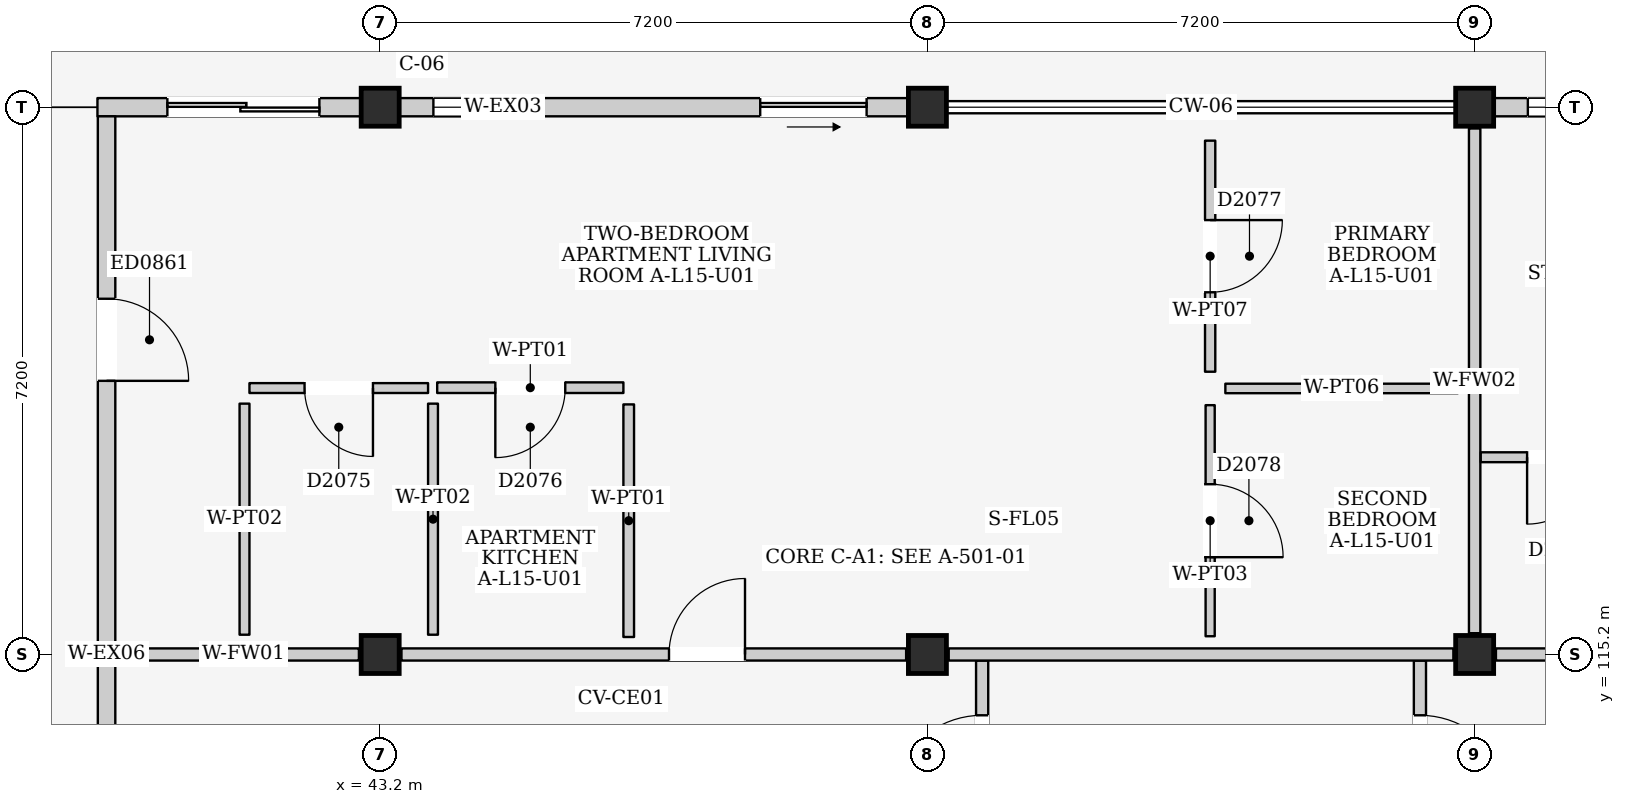
"""IFC4 building model, lengths in metres.
Left out: names, types, materials, properties, quantities, classifications, styles, units other than length and angle.
Written with IfcOpenShell. Run it as: python <this file> out.ifc"""

import sys

from ifc_helpers import new_model, si_unit, direction, frame, frame_2d, origin, origin_2d, place, context, subcontext, project, spatial, rectangle, extrude, element, fill, save


model = new_model("IFC4")
c1 = context("Model", 3, precision=1e-05, world=origin(), true_north=direction((0.0, 1.0)))
c2 = subcontext(c1, "Body", "Model", "MODEL_VIEW")
j1 = project(units=[si_unit("LENGTHUNIT", "METRE"), si_unit("PLANEANGLEUNIT", "RADIAN")], contexts=[c1])
p1 = place(None, origin())
s1 = spatial("IfcSite", under=j1, at=p1, CompositionType="ELEMENT")
p2 = place(p1, origin())
s2 = spatial("IfcBuilding", under=s1, at=p2, CompositionType="ELEMENT")
p3 = place(p2, frame((0.0, 0.0, 50.9)))
s3 = spatial("IfcBuildingStorey", under=s2, at=p3, CompositionType="ELEMENT", Elevation=50.9)
for number, where, z_axis, x_axis in (
    (1, (43.2, 115.2, 0.0), (0.0, 0.0, 1.0), (1.0, 0.0, 0.0)),
    (2, (43.2, 122.4, 0.0), (0.0, 0.0, 1.0), (1.0, 0.0, 0.0)),
    (3, (50.4, 115.2, 0.0), (0.0, 0.0, 1.0), (1.0, 0.0, 0.0)),
    (4, (50.4, 122.4, 0.0), (0.0, 0.0, 1.0), (1.0, 0.0, 0.0)),
    (5, (57.6, 115.2, 0.0), (0.0, 0.0, 1.0), (1.0, 0.0, 0.0)),
    (6, (57.6, 122.4, 0.0), (0.0, 0.0, 1.0), (1.0, 0.0, 0.0)),
):
    element("IfcColumn", number, at=place(p3, frame(where, z_axis=z_axis, x_axis=x_axis)), inside=s3, PredefinedType="COLUMN", context=c2, shape_type="SweptSolid", body=[
        extrude(rectangle(XDim=0.5, YDim=0.5, at=origin_2d()), origin(), (0.0, 0.0, 1.0), 3.2),
    ])
p4 = place(p3, frame((39.48, 122.4, 0.0), z_axis=(0.0, 0.0, 1.0), x_axis=(1.0, 0.0, 0.0)))
e7 = element("IfcWall", 7, at=p4, inside=s3, PredefinedType="ELEMENTEDWALL", context=c2, shape_type="SweptSolid", body=[
    extrude(rectangle(XDim=3.47, YDim=0.24, at=frame_2d((1.735, 0.0))), origin(), (0.0, 0.0, 1.0), 2.295),
])
p5 = place(p4, frame((0.92, 0.0, 0.0)))
e8 = element("IfcOpeningElement", 8, at=p5, cuts=e7, PredefinedType="OPENING", context=c2, shape_type="SweptSolid", body=[
    extrude(rectangle(XDim=2.0, YDim=2.12, at=frame_2d((1.0, 1.06))), frame((0.0, 0.135, 0.0), z_axis=(0.0, -1.0, 0.0), x_axis=(1.0, 0.0, 0.0)), (0.0, 0.0, 1.0), 0.27),
])
p6 = place(p3, frame((43.45, 122.4, 0.0), z_axis=(0.0, 0.0, 1.0), x_axis=(1.0, 0.0, 0.0)))
e9 = element("IfcWall", 9, at=p6, inside=s3, PredefinedType="ELEMENTEDWALL", context=c2, shape_type="SweptSolid", body=[
    extrude(rectangle(XDim=6.7, YDim=0.24, at=frame_2d((3.35, 0.0))), origin(), (0.0, 0.0, 1.0), 2.495),
])
p7 = place(p6, frame((4.75, 0.0, 0.0)))
e10 = element("IfcOpeningElement", 10, at=p7, cuts=e9, PredefinedType="OPENING", context=c2, shape_type="SweptSolid", body=[
    extrude(rectangle(XDim=1.4, YDim=2.1, at=frame_2d((0.7, 1.05))), frame((0.0, 0.135, 0.0), z_axis=(0.0, -1.0, 0.0), x_axis=(1.0, 0.0, 0.0)), (0.0, 0.0, 1.0), 0.27),
])
p8 = place(p6, frame((0.45, 0.0, 0.9)))
e11 = element("IfcOpeningElement", 11, at=p8, cuts=e9, PredefinedType="OPENING", context=c2, shape_type="SweptSolid", body=[
    extrude(rectangle(XDim=1.3, YDim=1.25, at=frame_2d((0.65, 0.625))), frame((0.0, 0.135, 0.0), z_axis=(0.0, -1.0, 0.0), x_axis=(1.0, 0.0, 0.0)), (0.0, 0.0, 1.0), 0.27),
])
p9 = place(p3, frame((57.85, 122.4, 0.0), z_axis=(0.0, 0.0, 1.0), x_axis=(1.0, 0.0, 0.0)))
e12 = element("IfcWall", 12, at=p9, inside=s3, PredefinedType="ELEMENTEDWALL", context=c2, shape_type="SweptSolid", body=[
    extrude(rectangle(XDim=6.7, YDim=0.24, at=frame_2d((3.35, 0.0))), origin(), (0.0, 0.0, 1.0), 2.495),
])
p10 = place(p9, frame((4.55, 0.0, 0.0)))
e13 = element("IfcOpeningElement", 13, at=p10, cuts=e12, PredefinedType="OPENING", context=c2, shape_type="SweptSolid", body=[
    extrude(rectangle(XDim=1.6, YDim=2.12, at=frame_2d((0.8, 1.06))), frame((0.0, 0.135, 0.0), z_axis=(0.0, -1.0, 0.0), x_axis=(1.0, 0.0, 0.0)), (0.0, 0.0, 1.0), 0.27),
])
p11 = place(p9, frame((0.45, 0.0, 0.835)))
e14 = element("IfcOpeningElement", 14, at=p11, cuts=e12, PredefinedType="OPENING", context=c2, shape_type="SweptSolid", body=[
    extrude(rectangle(XDim=1.75, YDim=1.55, at=frame_2d((0.875, 0.775))), frame((0.0, 0.135, 0.0), z_axis=(0.0, -1.0, 0.0), x_axis=(1.0, 0.0, 0.0)), (0.0, 0.0, 1.0), 0.27),
])
p12 = place(p3, frame((39.6, 108.12, 0.0), z_axis=(0.0, 0.0, 1.0), x_axis=(0.0, 1.0, 0.0)))
e15 = element("IfcWall", 15, at=p12, inside=s3, PredefinedType="ELEMENTEDWALL", context=c2, shape_type="SweptSolid", body=[
    extrude(rectangle(XDim=7.08, YDim=0.23, at=frame_2d((3.54, 0.0))), origin(), (0.0, 0.0, 1.0), 2.395),
])
p13 = place(p12, frame((2.75, 0.0, 1.1)))
e16 = element("IfcOpeningElement", 16, at=p13, cuts=e15, PredefinedType="OPENING", context=c2, shape_type="SweptSolid", body=[
    extrude(rectangle(XDim=1.0, YDim=0.9, at=frame_2d((0.5, 0.45))), frame((0.0, 0.13, 0.0), z_axis=(0.0, -1.0, 0.0), x_axis=(1.0, 0.0, 0.0)), (0.0, 0.0, 1.0), 0.26),
])
p14 = place(p3, frame((39.6, 115.2, 0.0), z_axis=(0.0, 0.0, 1.0), x_axis=(0.0, 1.0, 0.0)))
e17 = element("IfcWall", 17, at=p14, inside=s3, PredefinedType="ELEMENTEDWALL", context=c2, shape_type="SweptSolid", body=[
    extrude(rectangle(XDim=7.08, YDim=0.23, at=frame_2d((3.54, 0.0))), origin(), (0.0, 0.0, 1.0), 2.395),
])
p15 = place(p14, frame((3.6, 0.0, 0.0)))
e18 = element("IfcOpeningElement", 18, at=p15, cuts=e17, PredefinedType="OPENING", context=c2, shape_type="SweptSolid", body=[
    extrude(rectangle(XDim=1.08, YDim=2.12, at=frame_2d((0.54, 1.06))), frame((0.0, 0.13, 0.0), z_axis=(0.0, -1.0, 0.0), x_axis=(1.0, 0.0, 0.0)), (0.0, 0.0, 1.0), 0.26),
])
p16 = place(p3, frame((51.12, 111.1, 0.0), z_axis=(0.0, 0.0, 1.0), x_axis=(0.0, 1.0, 0.0)))
e19 = element("IfcWall", 19, at=p16, inside=s3, PredefinedType="PARTITIONING", context=c2, shape_type="SweptSolid", body=[
    extrude(rectangle(XDim=4.02, YDim=0.16, at=frame_2d((2.01, 0.0))), origin(), (0.0, 0.0, 1.0), 2.96),
])
p17 = place(p16, frame((2.1, 0.0, 0.0)))
e20 = element("IfcOpeningElement", 20, at=p17, cuts=e19, PredefinedType="OPENING", context=c2, shape_type="SweptSolid", body=[
    extrude(rectangle(XDim=1.2, YDim=2.2, at=frame_2d((0.6, 1.1))), frame((0.0, 0.095, 0.0), z_axis=(0.0, -1.0, 0.0), x_axis=(1.0, 0.0, 0.0)), (0.0, 0.0, 1.0), 0.19),
])
p18 = place(p3, frame((56.88, 111.1, 0.0), z_axis=(0.0, 0.0, 1.0), x_axis=(0.0, 1.0, 0.0)))
e21 = element("IfcWall", 21, at=p18, inside=s3, PredefinedType="PARTITIONING", context=c2, shape_type="SweptSolid", body=[
    extrude(rectangle(XDim=4.02, YDim=0.16, at=frame_2d((2.01, 0.0))), origin(), (0.0, 0.0, 1.0), 2.96),
])
p19 = place(p18, frame((2.1, 0.0, 0.0)))
e22 = element("IfcOpeningElement", 22, at=p19, cuts=e21, PredefinedType="OPENING", context=c2, shape_type="SweptSolid", body=[
    extrude(rectangle(XDim=1.2, YDim=2.2, at=frame_2d((0.6, 1.1))), frame((0.0, 0.095, 0.0), z_axis=(0.0, -1.0, 0.0), x_axis=(1.0, 0.0, 0.0)), (0.0, 0.0, 1.0), 0.19),
])
p20 = place(p3, frame((39.88, 115.2, 0.0), z_axis=(0.0, 0.0, 1.0), x_axis=(1.0, 0.0, 0.0)))
e23 = element("IfcWall", 23, at=p20, inside=s3, PredefinedType="PARTITIONING", context=c2, shape_type="SweptSolid", body=[
    extrude(rectangle(XDim=3.04, YDim=0.16, at=frame_2d((1.52, 0.0))), origin(), (0.0, 0.0, 1.0), 2.295),
])
p21 = place(p3, frame((43.48, 115.2, 0.0), z_axis=(0.0, 0.0, 1.0), x_axis=(1.0, 0.0, 0.0)))
e24 = element("IfcWall", 24, at=p21, inside=s3, PredefinedType="PARTITIONING", context=c2, shape_type="SweptSolid", body=[
    extrude(rectangle(XDim=6.64, YDim=0.16, at=frame_2d((3.32, 0.0))), origin(), (0.0, 0.0, 1.0), 2.295),
])
p22 = place(p21, frame((3.52, 0.0, 0.0)))
e25 = element("IfcOpeningElement", 25, at=p22, cuts=e24, PredefinedType="OPENING", context=c2, shape_type="SweptSolid", body=[
    extrude(rectangle(XDim=1.0, YDim=2.15, at=frame_2d((0.5, 1.075))), frame((0.0, 0.095, 0.0), z_axis=(0.0, -1.0, 0.0), x_axis=(1.0, 0.0, 0.0)), (0.0, 0.0, 1.0), 0.19),
])
p23 = place(p3, frame((50.68, 115.2, 0.0), z_axis=(0.0, 0.0, 1.0), x_axis=(1.0, 0.0, 0.0)))
e26 = element("IfcWall", 26, at=p23, inside=s3, PredefinedType="PARTITIONING", context=c2, shape_type="SweptSolid", body=[
    extrude(rectangle(XDim=6.64, YDim=0.16, at=frame_2d((3.32, 0.0))), origin(), (0.0, 0.0, 1.0), 2.295),
])
p24 = place(p3, frame((57.6, 115.48, 0.0), z_axis=(0.0, 0.0, 1.0), x_axis=(0.0, 1.0, 0.0)))
e27 = element("IfcWall", 27, at=p24, inside=s3, PredefinedType="PARTITIONING", context=c2, shape_type="SweptSolid", body=[
    extrude(rectangle(XDim=6.64, YDim=0.15, at=frame_2d((3.32, 0.0))), origin(), (0.0, 0.0, 1.0), 2.445),
])
p25 = place(p3, frame((41.48, 118.705, 0.0), z_axis=(0.0, 0.0, 1.0), x_axis=(1.0, 0.0, 0.0)))
e28 = element("IfcWall", 28, at=p25, inside=s3, PredefinedType="PARTITIONING", context=c2, shape_type="SweptSolid", body=[
    extrude(rectangle(XDim=2.35, YDim=0.13, at=frame_2d((1.175, 0.0))), origin(), (0.0, 0.0, 1.0), 2.96),
])
p26 = place(p25, frame((0.725, 0.0, 0.0)))
e29 = element("IfcOpeningElement", 29, at=p26, cuts=e28, PredefinedType="OPENING", context=c2, shape_type="SweptSolid", body=[
    extrude(rectangle(XDim=0.9, YDim=2.1, at=frame_2d((0.45, 1.05))), frame((0.0, 0.08, 0.0), z_axis=(0.0, -1.0, 0.0), x_axis=(1.0, 0.0, 0.0)), (0.0, 0.0, 1.0), 0.16),
])
for number, where, z_axis, x_axis in (
    (30, (43.895, 115.46, 0.0), (0.0, 0.0, 1.0), (0.0, 1.0, 0.0)),
    (31, (41.415, 115.46, 0.0), (0.0, 0.0, 1.0), (0.0, 1.0, 0.0)),
):
    element("IfcWall", number, at=place(p3, frame(where, z_axis=z_axis, x_axis=x_axis)), inside=s3, PredefinedType="PARTITIONING", context=c2, shape_type="SweptSolid", body=[
        extrude(rectangle(XDim=3.04, YDim=0.13, at=frame_2d((1.52, 0.0))), origin(), (0.0, 0.0, 1.0), 2.96),
    ])
p27 = place(p3, frame((43.95, 118.71, 0.0), z_axis=(0.0, 0.0, 1.0), x_axis=(1.0, 0.0, 0.0)))
e32 = element("IfcWall", 32, at=p27, inside=s3, PredefinedType="PARTITIONING", context=c2, shape_type="SweptSolid", body=[
    extrude(rectangle(XDim=2.45, YDim=0.14, at=frame_2d((1.225, 0.0))), origin(), (0.0, 0.0, 1.0), 2.96),
])
p28 = place(p27, frame((0.765, 0.0, 0.0)))
e33 = element("IfcOpeningElement", 33, at=p28, cuts=e32, PredefinedType="OPENING", context=c2, shape_type="SweptSolid", body=[
    extrude(rectangle(XDim=0.92, YDim=2.1, at=frame_2d((0.46, 1.05))), frame((0.0, 0.085, 0.0), z_axis=(0.0, -1.0, 0.0), x_axis=(1.0, 0.0, 0.0)), (0.0, 0.0, 1.0), 0.17),
])
p29 = place(p3, frame((46.47, 115.43, 0.0), z_axis=(0.0, 0.0, 1.0), x_axis=(0.0, 1.0, 0.0)))
e34 = element("IfcWall", 34, at=p29, inside=s3, PredefinedType="PARTITIONING", context=c2, shape_type="SweptSolid", body=[
    extrude(rectangle(XDim=3.06, YDim=0.14, at=frame_2d((1.53, 0.0))), origin(), (0.0, 0.0, 1.0), 2.96),
])
p30 = place(p3, frame((54.12, 118.92, 0.0), z_axis=(0.0, 0.0, 1.0), x_axis=(0.0, 1.0, 0.0)))
e35 = element("IfcWall", 35, at=p30, inside=s3, PredefinedType="PARTITIONING", context=c2, shape_type="SweptSolid", body=[
    extrude(rectangle(XDim=3.04, YDim=0.135, at=frame_2d((1.52, 0.0))), origin(), (0.0, 0.0, 1.0), 2.96),
])
p31 = place(p30, frame((1.045, 0.0, 0.0)))
e36 = element("IfcOpeningElement", 36, at=p31, cuts=e35, PredefinedType="OPENING", context=c2, shape_type="SweptSolid", body=[
    extrude(rectangle(XDim=0.95, YDim=2.15, at=frame_2d((0.475, 1.075))), frame((0.0, 0.083, 0.0), z_axis=(0.0, -1.0, 0.0), x_axis=(1.0, 0.0, 0.0)), (0.0, 0.0, 1.0), 0.165),
])
p32 = place(p3, frame((54.32, 118.7, 0.0), z_axis=(0.0, 0.0, 1.0), x_axis=(1.0, 0.0, 0.0)))
e37 = element("IfcWall", 37, at=p32, inside=s3, PredefinedType="PARTITIONING", context=c2, shape_type="SweptSolid", body=[
    extrude(rectangle(XDim=3.06, YDim=0.125, at=frame_2d((1.53, 0.0))), origin(), (0.0, 0.0, 1.0), 2.96),
])
p33 = place(p3, frame((54.12, 115.44, 0.0), z_axis=(0.0, 0.0, 1.0), x_axis=(0.0, 1.0, 0.0)))
e38 = element("IfcWall", 38, at=p33, inside=s3, PredefinedType="PARTITIONING", context=c2, shape_type="SweptSolid", body=[
    extrude(rectangle(XDim=3.04, YDim=0.12, at=frame_2d((1.52, 0.0))), origin(), (0.0, 0.0, 1.0), 2.96),
])
p34 = place(p33, frame((1.04, 0.0, 0.0)))
e39 = element("IfcOpeningElement", 39, at=p34, cuts=e38, PredefinedType="OPENING", context=c2, shape_type="SweptSolid", body=[
    extrude(rectangle(XDim=0.96, YDim=2.15, at=frame_2d((0.48, 1.075))), frame((0.0, 0.075, 0.0), z_axis=(0.0, -1.0, 0.0), x_axis=(1.0, 0.0, 0.0)), (0.0, 0.0, 1.0), 0.15),
])
p35 = place(p3, frame((57.88, 115.2, 0.0), z_axis=(0.0, 0.0, 1.0), x_axis=(1.0, 0.0, 0.0)))
e40 = element("IfcWall", 40, at=p35, inside=s3, PredefinedType="PARTITIONING", context=c2, shape_type="SweptSolid", body=[
    extrude(rectangle(XDim=6.64, YDim=0.16, at=frame_2d((3.32, 0.0))), origin(), (0.0, 0.0, 1.0), 2.295),
])
p36 = place(p35, frame((2.82, 0.0, 0.0)))
e41 = element("IfcOpeningElement", 41, at=p36, cuts=e40, PredefinedType="OPENING", context=c2, shape_type="SweptSolid", body=[
    extrude(rectangle(XDim=1.0, YDim=2.15, at=frame_2d((0.5, 1.075))), frame((0.0, 0.095, 0.0), z_axis=(0.0, -1.0, 0.0), x_axis=(1.0, 0.0, 0.0)), (0.0, 0.0, 1.0), 0.19),
])
p37 = place(p3, frame((57.68, 117.795, 0.0), z_axis=(0.0, 0.0, 1.0), x_axis=(1.0, 0.0, 0.0)))
e42 = element("IfcWall", 42, at=p37, inside=s3, PredefinedType="PARTITIONING", context=c2, shape_type="SweptSolid", body=[
    extrude(rectangle(XDim=2.1, YDim=0.13, at=frame_2d((1.05, 0.0))), origin(), (0.0, 0.0, 1.0), 2.96),
])
p38 = place(p37, frame((0.61, 0.0, 0.0)))
e43 = element("IfcOpeningElement", 43, at=p38, cuts=e42, PredefinedType="OPENING", context=c2, shape_type="SweptSolid", body=[
    extrude(rectangle(XDim=0.88, YDim=2.1, at=frame_2d((0.44, 1.05))), frame((0.0, 0.08, 0.0), z_axis=(0.0, -1.0, 0.0), x_axis=(1.0, 0.0, 0.0)), (0.0, 0.0, 1.0), 0.16),
])
p39 = place(p5, frame((2.0, 0.0, 0.0), z_axis=(0.0, 0.0, 1.0), x_axis=(-1.0, 0.0, 0.0)))
e44 = element("IfcDoor", 44, at=p39, inside=s3, OperationType="DOUBLE_DOOR_SLIDING", PredefinedType="DOOR", context=c2, shape_type="SweptSolid", body=[
    extrude(rectangle(XDim=2.0, YDim=2.12, at=frame_2d((1.0, 1.06))), frame((0.0, 0.025, 0.0), z_axis=(0.0, -1.0, 0.0), x_axis=(1.0, 0.0, 0.0)), (0.0, 0.0, 1.0), 0.05),
])
fill(e8, e44)
p40 = place(p7, frame((1.4, 0.0, 0.0), z_axis=(0.0, 0.0, 1.0), x_axis=(-1.0, 0.0, 0.0)))
e45 = element("IfcDoor", 45, at=p40, inside=s3, OperationType="SLIDING_TO_RIGHT", PredefinedType="DOOR", context=c2, shape_type="SweptSolid", body=[
    extrude(rectangle(XDim=1.4, YDim=2.1, at=frame_2d((0.7, 1.05))), frame((0.0, 0.025, 0.0), z_axis=(0.0, -1.0, 0.0), x_axis=(1.0, 0.0, 0.0)), (0.0, 0.0, 1.0), 0.05),
])
fill(e10, e45)
p41 = place(p8, origin())
e46 = element("IfcWindow", 46, at=p41, inside=s3, PartitioningType="SINGLE_PANEL", PredefinedType="WINDOW", context=c2, shape_type="SweptSolid", body=[
    extrude(rectangle(XDim=1.3, YDim=1.25, at=frame_2d((0.65, 0.625))), frame((0.0, 0.03, 0.0), z_axis=(0.0, -1.0, 0.0), x_axis=(1.0, 0.0, 0.0)), (0.0, 0.0, 1.0), 0.06),
])
fill(e11, e46)
p42 = place(p11, origin())
e47 = element("IfcWindow", 47, at=p42, inside=s3, PartitioningType="DOUBLE_PANEL_VERTICAL", PredefinedType="WINDOW", context=c2, shape_type="SweptSolid", body=[
    extrude(rectangle(XDim=1.75, YDim=1.55, at=frame_2d((0.875, 0.775))), frame((0.0, 0.03, 0.0), z_axis=(0.0, -1.0, 0.0), x_axis=(1.0, 0.0, 0.0)), (0.0, 0.0, 1.0), 0.06),
])
fill(e14, e47)
p43 = place(p15, frame((1.08, 0.0, 0.0), z_axis=(0.0, 0.0, 1.0), x_axis=(-1.0, 0.0, 0.0)))
e48 = element("IfcDoor", 48, at=p43, inside=s3, OperationType="SINGLE_SWING_RIGHT", PredefinedType="DOOR", context=c2, shape_type="SweptSolid", body=[
    extrude(rectangle(XDim=1.08, YDim=2.12, at=frame_2d((0.54, 1.06))), frame((0.0, 0.025, 0.0), z_axis=(0.0, -1.0, 0.0), x_axis=(1.0, 0.0, 0.0)), (0.0, 0.0, 1.0), 0.05),
])
fill(e18, e48)
p44 = place(p17, origin())
e49 = element("IfcDoor", 49, at=p44, inside=s3, OperationType="SINGLE_SWING_LEFT", PredefinedType="DOOR", context=c2, shape_type="SweptSolid", body=[
    extrude(rectangle(XDim=1.2, YDim=2.2, at=frame_2d((0.6, 1.1))), frame((0.0, 0.025, 0.0), z_axis=(0.0, -1.0, 0.0), x_axis=(1.0, 0.0, 0.0)), (0.0, 0.0, 1.0), 0.05),
])
fill(e20, e49)
p45 = place(p19, frame((1.2, 0.0, 0.0), z_axis=(0.0, 0.0, 1.0), x_axis=(-1.0, 0.0, 0.0)))
e50 = element("IfcDoor", 50, at=p45, inside=s3, OperationType="SINGLE_SWING_RIGHT", PredefinedType="DOOR", context=c2, shape_type="SweptSolid", body=[
    extrude(rectangle(XDim=1.2, YDim=2.2, at=frame_2d((0.6, 1.1))), frame((0.0, 0.025, 0.0), z_axis=(0.0, -1.0, 0.0), x_axis=(1.0, 0.0, 0.0)), (0.0, 0.0, 1.0), 0.05),
])
fill(e22, e50)
p46 = place(p22, origin())
e51 = element("IfcDoor", 51, at=p46, inside=s3, OperationType="SINGLE_SWING_RIGHT", PredefinedType="DOOR", context=c2, shape_type="SweptSolid", body=[
    extrude(rectangle(XDim=1.0, YDim=2.15, at=frame_2d((0.5, 1.075))), frame((0.0, 0.025, 0.0), z_axis=(0.0, -1.0, 0.0), x_axis=(1.0, 0.0, 0.0)), (0.0, 0.0, 1.0), 0.05),
])
fill(e25, e51)
p47 = place(p26, frame((0.9, 0.0, 0.0), z_axis=(0.0, 0.0, 1.0), x_axis=(-1.0, 0.0, 0.0)))
e52 = element("IfcDoor", 52, at=p47, inside=s3, OperationType="SINGLE_SWING_LEFT", PredefinedType="DOOR", context=c2, shape_type="SweptSolid", body=[
    extrude(rectangle(XDim=0.9, YDim=2.1, at=frame_2d((0.45, 1.05))), frame((0.0, 0.025, 0.0), z_axis=(0.0, -1.0, 0.0), x_axis=(1.0, 0.0, 0.0)), (0.0, 0.0, 1.0), 0.05),
])
fill(e29, e52)
p48 = place(p28, frame((0.92, 0.0, 0.0), z_axis=(0.0, 0.0, 1.0), x_axis=(-1.0, 0.0, 0.0)))
e53 = element("IfcDoor", 53, at=p48, inside=s3, OperationType="SINGLE_SWING_RIGHT", PredefinedType="DOOR", context=c2, shape_type="SweptSolid", body=[
    extrude(rectangle(XDim=0.92, YDim=2.1, at=frame_2d((0.46, 1.05))), frame((0.0, 0.025, 0.0), z_axis=(0.0, -1.0, 0.0), x_axis=(1.0, 0.0, 0.0)), (0.0, 0.0, 1.0), 0.05),
])
fill(e33, e53)
p49 = place(p31, frame((0.95, 0.0, 0.0), z_axis=(0.0, 0.0, 1.0), x_axis=(-1.0, 0.0, 0.0)))
e54 = element("IfcDoor", 54, at=p49, inside=s3, OperationType="SINGLE_SWING_LEFT", PredefinedType="DOOR", context=c2, shape_type="SweptSolid", body=[
    extrude(rectangle(XDim=0.95, YDim=2.15, at=frame_2d((0.475, 1.075))), frame((0.0, 0.025, 0.0), z_axis=(0.0, -1.0, 0.0), x_axis=(1.0, 0.0, 0.0)), (0.0, 0.0, 1.0), 0.05),
])
fill(e36, e54)
p50 = place(p34, frame((0.96, 0.0, 0.0), z_axis=(0.0, 0.0, 1.0), x_axis=(-1.0, 0.0, 0.0)))
e55 = element("IfcDoor", 55, at=p50, inside=s3, OperationType="SINGLE_SWING_RIGHT", PredefinedType="DOOR", context=c2, shape_type="SweptSolid", body=[
    extrude(rectangle(XDim=0.96, YDim=2.15, at=frame_2d((0.48, 1.075))), frame((0.0, 0.025, 0.0), z_axis=(0.0, -1.0, 0.0), x_axis=(1.0, 0.0, 0.0)), (0.0, 0.0, 1.0), 0.05),
])
fill(e39, e55)
p51 = place(p38, frame((0.88, 0.0, 0.0), z_axis=(0.0, 0.0, 1.0), x_axis=(-1.0, 0.0, 0.0)))
e56 = element("IfcDoor", 56, at=p51, inside=s3, OperationType="SINGLE_SWING_RIGHT", PredefinedType="DOOR", context=c2, shape_type="SweptSolid", body=[
    extrude(rectangle(XDim=0.88, YDim=2.1, at=frame_2d((0.44, 1.05))), frame((0.0, 0.025, 0.0), z_axis=(0.0, -1.0, 0.0), x_axis=(1.0, 0.0, 0.0)), (0.0, 0.0, 1.0), 0.05),
])
fill(e43, e56)
save(model, sys.argv[1])
